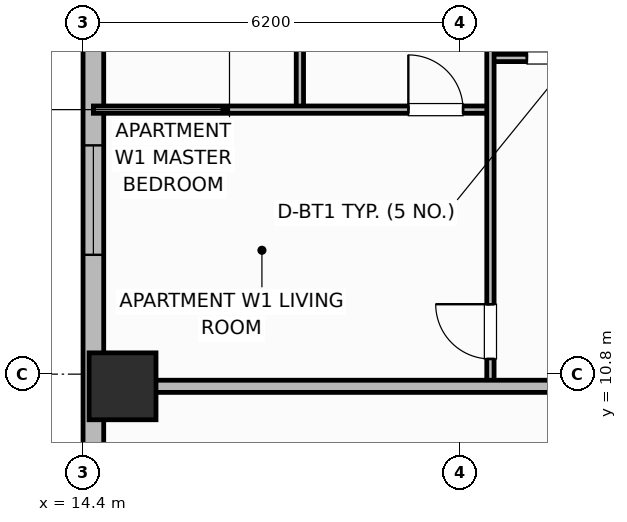
"""IFC4 building model, lengths in metres.
Left out: names, types, materials, properties, quantities, classifications, styles, units other than length and angle.
Written with IfcOpenShell. Run it as: python <this file> out.ifc"""

import sys

from ifc_helpers import new_model, si_unit, direction, frame, frame_2d, origin, origin_2d, place, context, subcontext, project, spatial, rectangle, extrude, element, fill, save


model = new_model("IFC4")
c1 = context("Model", 3, precision=1e-05, world=origin(), true_north=direction((0.0, 1.0)))
c2 = subcontext(c1, "Body", "Model", "MODEL_VIEW")
j1 = project(units=[si_unit("LENGTHUNIT", "METRE"), si_unit("PLANEANGLEUNIT", "RADIAN")], contexts=[c1])
p1 = place(None, origin())
s1 = spatial("IfcSite", under=j1, at=p1, CompositionType="ELEMENT")
p2 = place(p1, origin())
s2 = spatial("IfcBuilding", under=s1, at=p2, CompositionType="ELEMENT")
p3 = place(p2, frame((0.0, 0.0, 121.6)))
s3 = spatial("IfcBuildingStorey", under=s2, at=p3, CompositionType="ELEMENT", Elevation=121.6)
p4 = place(p3, frame((15.05, 10.6, 0.0), z_axis=(0.0, 0.0, 1.0), x_axis=(1.0, 0.0, 0.0)))
e1 = element("IfcColumn", 1, at=p4, inside=s3, PredefinedType="COLUMN", context=c2, shape_type="SweptSolid", body=[
    extrude(rectangle(XDim=1.1, YDim=1.1, at=origin_2d()), origin(), (0.0, 0.0, 1.0), 3.7),
])
p5 = place(p3, frame((14.57, 23.8, 0.0), z_axis=(0.0, 0.0, 1.0), x_axis=(0.0, -1.0, 0.0)))
e2 = element("IfcWall", 2, at=p5, inside=s3, PredefinedType="SOLIDWALL", context=c2, shape_type="SweptSolid", body=[
    extrude(rectangle(XDim=14.8, YDim=0.34, at=frame_2d((7.4, 0.0))), origin(), (0.0, 0.0, 1.0), 2.7),
])
p6 = place(p5, frame((1.7, 0.0, 0.0)))
e3 = element("IfcOpeningElement", 3, at=p6, cuts=e2, PredefinedType="OPENING", context=c2, shape_type="SweptSolid", body=[
    extrude(rectangle(XDim=1.6, YDim=2.1, at=frame_2d((0.8, 1.05))), frame((0.0, 0.18, 0.0), z_axis=(0.0, -1.0, 0.0), x_axis=(1.0, 0.0, 0.0)), (0.0, 0.0, 1.0), 0.36),
])
p7 = place(p5, frame((3.762, 0.0, 0.73)))
e4 = element("IfcOpeningElement", 4, at=p7, cuts=e2, PredefinedType="OPENING", context=c2, shape_type="SweptSolid", body=[
    extrude(rectangle(XDim=1.8, YDim=1.85, at=frame_2d((0.9, 0.925))), frame((0.0, 0.18, 0.0), z_axis=(0.0, -1.0, 0.0), x_axis=(1.0, 0.0, 0.0)), (0.0, 0.0, 1.0), 0.36),
])
p8 = place(p5, frame((9.238, 0.0, 0.73)))
e5 = element("IfcOpeningElement", 5, at=p8, cuts=e2, PredefinedType="OPENING", context=c2, shape_type="SweptSolid", body=[
    extrude(rectangle(XDim=1.8, YDim=1.85, at=frame_2d((0.9, 0.925))), frame((0.0, 0.18, 0.0), z_axis=(0.0, -1.0, 0.0), x_axis=(1.0, 0.0, 0.0)), (0.0, 0.0, 1.0), 0.36),
])
p9 = place(p3, frame((21.1, 16.0, 0.0), z_axis=(0.0, 0.0, 1.0), x_axis=(1.0, 0.0, 0.0)))
e6 = element("IfcWall", 6, at=p9, inside=s3, PredefinedType="PARTITIONING", context=c2, shape_type="SweptSolid", body=[
    extrude(rectangle(XDim=2.25, YDim=0.12, at=frame_2d((1.125, 0.0))), origin(), (0.0, 0.0, 1.0), 2.53),
])
p10 = place(p9, frame((0.6, 0.0, 0.0)))
e7 = element("IfcOpeningElement", 7, at=p10, cuts=e6, PredefinedType="OPENING", context=c2, shape_type="SweptSolid", body=[
    extrude(rectangle(XDim=0.85, YDim=2.1, at=frame_2d((0.425, 1.05))), frame((0.0, 0.07, 0.0), z_axis=(0.0, -1.0, 0.0), x_axis=(1.0, 0.0, 0.0)), (0.0, 0.0, 1.0), 0.14),
])
p11 = place(p3, frame((17.966, 15.19, 0.0), z_axis=(0.0, 0.0, 1.0), x_axis=(0.0, 1.0, 0.0)))
e8 = element("IfcWall", 8, at=p11, inside=s3, PredefinedType="PARTITIONING", context=c2, shape_type="SweptSolid", body=[
    extrude(rectangle(XDim=7.52, YDim=0.12, at=frame_2d((3.76, 0.0))), origin(), (0.0, 0.0, 1.0), 2.53),
])
p12 = place(p11, frame((2.86, 0.0, 0.0)))
e9 = element("IfcOpeningElement", 9, at=p12, cuts=e8, PredefinedType="OPENING", context=c2, shape_type="SweptSolid", body=[
    extrude(rectangle(XDim=0.9, YDim=2.1, at=frame_2d((0.45, 1.05))), frame((0.0, 0.07, 0.0), z_axis=(0.0, -1.0, 0.0), x_axis=(1.0, 0.0, 0.0)), (0.0, 0.0, 1.0), 0.14),
])
p13 = place(p3, frame((14.57, 15.15, 0.0), z_axis=(0.0, 0.0, 1.0), x_axis=(1.0, 0.0, 0.0)))
e10 = element("IfcWall", 10, at=p13, inside=s3, PredefinedType="PARTITIONING", context=c2, shape_type="SweptSolid", body=[
    extrude(rectangle(XDim=6.53, YDim=0.12, at=frame_2d((3.265, 0.0))), origin(), (0.0, 0.0, 1.0), 2.53),
])
p14 = place(p13, frame((5.18, 0.0, 0.0)))
e11 = element("IfcOpeningElement", 11, at=p14, cuts=e10, PredefinedType="OPENING", context=c2, shape_type="SweptSolid", body=[
    extrude(rectangle(XDim=0.9, YDim=2.1, at=frame_2d((0.45, 1.05))), frame((0.0, 0.07, 0.0), z_axis=(0.0, -1.0, 0.0), x_axis=(1.0, 0.0, 0.0)), (0.0, 0.0, 1.0), 0.14),
])
p15 = place(p3, frame((21.1, 10.64, 0.0), z_axis=(0.0, 0.0, 1.0), x_axis=(0.0, 1.0, 0.0)))
e12 = element("IfcWall", 12, at=p15, inside=s3, PredefinedType="PARTITIONING", context=c2, shape_type="SweptSolid", body=[
    extrude(rectangle(XDim=15.92, YDim=0.12, at=frame_2d((7.96, 0.0))), origin(), (0.0, 0.0, 1.0), 2.53),
])
p16 = place(p15, frame((0.41, 0.0, 0.0)))
e13 = element("IfcOpeningElement", 13, at=p16, cuts=e12, PredefinedType="OPENING", context=c2, shape_type="SweptSolid", body=[
    extrude(rectangle(XDim=0.9, YDim=2.1, at=frame_2d((0.45, 1.05))), frame((0.0, 0.07, 0.0), z_axis=(0.0, -1.0, 0.0), x_axis=(1.0, 0.0, 0.0)), (0.0, 0.0, 1.0), 0.14),
])
p17 = place(p15, frame((13.125, 0.0, 0.0)))
e14 = element("IfcOpeningElement", 14, at=p17, cuts=e12, PredefinedType="OPENING", context=c2, shape_type="SweptSolid", body=[
    extrude(rectangle(XDim=0.82, YDim=2.08, at=frame_2d((0.41, 1.04))), frame((0.0, 0.07, 0.0), z_axis=(0.0, -1.0, 0.0), x_axis=(1.0, 0.0, 0.0)), (0.0, 0.0, 1.0), 0.14),
])
p18 = place(p3, frame((14.99, 10.6, 0.0), z_axis=(0.0, 0.0, 1.0), x_axis=(1.0, 0.0, 0.0)))
e15 = element("IfcWall", 15, at=p18, inside=s3, PredefinedType="PARTITIONING", context=c2, shape_type="SweptSolid", body=[
    extrude(rectangle(XDim=8.36, YDim=0.2, at=frame_2d((4.18, 0.0))), origin(), (0.0, 0.0, 1.0), 2.53),
])
p19 = place(p8, origin())
e16 = element("IfcWindow", 16, at=p19, inside=s3, PartitioningType="SINGLE_PANEL", PredefinedType="WINDOW", context=c2, shape_type="SweptSolid", body=[
    extrude(rectangle(XDim=1.8, YDim=1.85, at=frame_2d((0.9, 0.925))), frame((0.0, 0.03, 0.0), z_axis=(0.0, -1.0, 0.0), x_axis=(1.0, 0.0, 0.0)), (0.0, 0.0, 1.0), 0.06),
])
fill(e5, e16)
p20 = place(p10, origin())
e17 = element("IfcDoor", 17, at=p20, inside=s3, OperationType="SINGLE_SWING_LEFT", PredefinedType="DOOR", context=c2, shape_type="SweptSolid", body=[
    extrude(rectangle(XDim=0.85, YDim=2.1, at=frame_2d((0.425, 1.05))), frame((0.0, 0.025, 0.0), z_axis=(0.0, -1.0, 0.0), x_axis=(1.0, 0.0, 0.0)), (0.0, 0.0, 1.0), 0.05),
])
fill(e7, e17)
p21 = place(p14, origin())
e18 = element("IfcDoor", 18, at=p21, inside=s3, OperationType="SINGLE_SWING_LEFT", PredefinedType="DOOR", context=c2, shape_type="SweptSolid", body=[
    extrude(rectangle(XDim=0.9, YDim=2.1, at=frame_2d((0.45, 1.05))), frame((0.0, 0.025, 0.0), z_axis=(0.0, -1.0, 0.0), x_axis=(1.0, 0.0, 0.0)), (0.0, 0.0, 1.0), 0.05),
])
fill(e11, e18)
p22 = place(p16, origin())
e19 = element("IfcDoor", 19, at=p22, inside=s3, OperationType="SINGLE_SWING_RIGHT", PredefinedType="DOOR", context=c2, shape_type="SweptSolid", body=[
    extrude(rectangle(XDim=0.9, YDim=2.1, at=frame_2d((0.45, 1.05))), frame((0.0, 0.025, 0.0), z_axis=(0.0, -1.0, 0.0), x_axis=(1.0, 0.0, 0.0)), (0.0, 0.0, 1.0), 0.05),
])
fill(e13, e19)
save(model, sys.argv[1])
